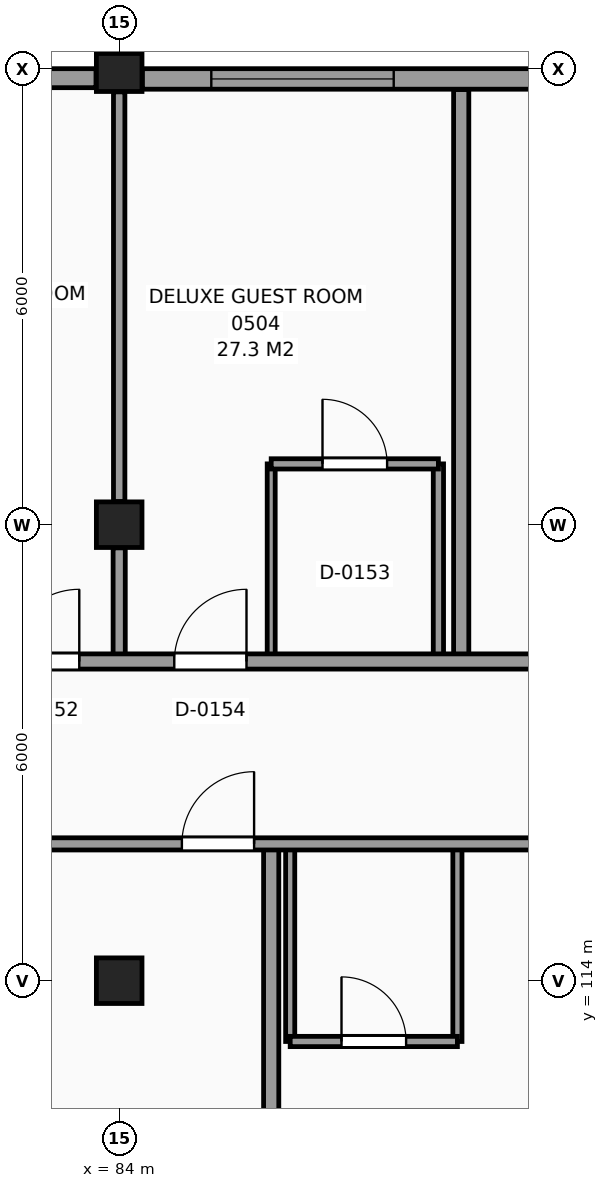
"""IFC4 building model, lengths in metres.
Left out: names, types, materials, properties, quantities, classifications, styles, units other than length and angle.
Written with IfcOpenShell. Run it as: python <this file> out.ifc"""

import sys

from ifc_helpers import new_model, si_unit, direction, frame, frame_2d, origin, origin_2d, place, context, subcontext, project, spatial, rectangle, extrude, element, fill, save


model = new_model("IFC4")
c1 = context("Model", 3, precision=1e-05, world=origin(), true_north=direction((0.0, 1.0)))
c2 = subcontext(c1, "Body", "Model", "MODEL_VIEW")
j1 = project(units=[si_unit("LENGTHUNIT", "METRE"), si_unit("PLANEANGLEUNIT", "RADIAN")], contexts=[c1])
p1 = place(None, origin())
s1 = spatial("IfcSite", under=j1, at=p1, CompositionType="ELEMENT")
p2 = place(p1, origin())
s2 = spatial("IfcBuilding", under=s1, at=p2, CompositionType="ELEMENT")
p3 = place(p2, frame((0.0, 0.0, 24.6)))
s3 = spatial("IfcBuildingStorey", under=s2, at=p3, CompositionType="ELEMENT", Elevation=24.6)
for number, where, z_axis, x_axis in (
    (1, (84.0, 114.0, 0.0), (0.0, 0.0, 1.0), (1.0, 0.0, 0.0)),
    (2, (84.0, 120.0, 0.0), (0.0, 0.0, 1.0), (1.0, 0.0, 0.0)),
    (3, (84.0, 126.0, 0.0), (0.0, 0.0, 1.0), (1.0, 0.0, 0.0)),
):
    element("IfcColumn", number, at=place(p3, frame(where, z_axis=z_axis, x_axis=x_axis)), inside=s3, PredefinedType="COLUMN", context=c2, shape_type="SweptSolid", body=[
        extrude(rectangle(XDim=0.6, YDim=0.6, at=origin_2d()), origin(), (0.0, 0.0, 1.0), 3.6),
    ])
p4 = place(p3, frame((89.72, 125.865, 0.0), z_axis=(0.0, 0.0, 1.0), x_axis=(-1.0, 0.0, 0.0)))
e4 = element("IfcWall", 4, at=p4, inside=s3, PredefinedType="SOLIDWALL", context=c2, shape_type="SweptSolid", body=[
    extrude(rectangle(XDim=5.415, YDim=0.27, at=frame_2d((2.708, 0.0))), origin(), (0.0, 0.0, 1.0), 2.73),
])
p5 = place(p4, frame((2.108, 0.0, 0.8)))
e5 = element("IfcOpeningElement", 5, at=p5, cuts=e4, PredefinedType="OPENING", context=c2, shape_type="SweptSolid", body=[
    extrude(rectangle(XDim=2.4, YDim=1.75, at=frame_2d((1.2, 0.875))), frame((0.0, 0.145, 0.0), z_axis=(0.0, -1.0, 0.0), x_axis=(1.0, 0.0, 0.0)), (0.0, 0.0, 1.0), 0.29),
])
p6 = place(p3, frame((83.695, 125.875, 0.0), z_axis=(0.0, 0.0, 1.0), x_axis=(-1.0, 0.0, 0.0)))
e6 = element("IfcWall", 6, at=p6, inside=s3, PredefinedType="SOLIDWALL", context=c2, shape_type="SweptSolid", body=[
    extrude(rectangle(XDim=5.415, YDim=0.25, at=frame_2d((2.708, 0.0))), origin(), (0.0, 0.0, 1.0), 2.73),
])
p7 = place(p6, frame((0.907, 0.0, 0.8)))
e7 = element("IfcOpeningElement", 7, at=p7, cuts=e6, PredefinedType="OPENING", context=c2, shape_type="SweptSolid", body=[
    extrude(rectangle(XDim=2.4, YDim=1.75, at=frame_2d((1.2, 0.875))), frame((0.0, 0.135, 0.0), z_axis=(0.0, -1.0, 0.0), x_axis=(1.0, 0.0, 0.0)), (0.0, 0.0, 1.0), 0.27),
])
p8 = place(p3, frame((84.0, 118.2, 0.0), z_axis=(0.0, 0.0, 1.0), x_axis=(0.0, 1.0, 0.0)))
e8 = element("IfcWall", 8, at=p8, inside=s3, PredefinedType="PARTITIONING", context=c2, shape_type="SweptSolid", body=[
    extrude(rectangle(XDim=1.495, YDim=0.16, at=frame_2d((0.748, 0.0))), origin(), (0.0, 0.0, 1.0), 2.58),
])
p9 = place(p3, frame((84.0, 120.305, 0.0), z_axis=(0.0, 0.0, 1.0), x_axis=(0.0, 1.0, 0.0)))
e9 = element("IfcWall", 9, at=p9, inside=s3, PredefinedType="PARTITIONING", context=c2, shape_type="SweptSolid", body=[
    extrude(rectangle(XDim=5.39, YDim=0.15, at=frame_2d((2.695, 0.0))), origin(), (0.0, 0.0, 1.0), 2.58),
])
p10 = place(p3, frame((86.0, 108.235, 0.0), z_axis=(0.0, 0.0, 1.0), x_axis=(0.0, 1.0, 0.0)))
e10 = element("IfcWall", 10, at=p10, inside=s3, PredefinedType="PARTITIONING", context=c2, shape_type="SweptSolid", body=[
    extrude(rectangle(XDim=7.565, YDim=0.2, at=frame_2d((3.782, 0.0))), origin(), (0.0, 0.0, 1.0), 3.38),
])
p11 = place(p3, frame((86.0, 118.2, 0.0), z_axis=(0.0, 0.0, 1.0), x_axis=(0.0, 1.0, 0.0)))
e11 = element("IfcWall", 11, at=p11, inside=s3, PredefinedType="PARTITIONING", context=c2, shape_type="SweptSolid", body=[
    extrude(rectangle(XDim=2.6, YDim=0.105, at=frame_2d((1.3, 0.0))), origin(), (0.0, 0.0, 1.0), 3.38),
])
p12 = place(p3, frame((86.25, 113.2, 0.0), z_axis=(0.0, 0.0, 1.0), x_axis=(0.0, 1.0, 0.0)))
e12 = element("IfcWall", 12, at=p12, inside=s3, PredefinedType="PARTITIONING", context=c2, shape_type="SweptSolid", body=[
    extrude(rectangle(XDim=2.6, YDim=0.12, at=frame_2d((1.3, 0.0))), origin(), (0.0, 0.0, 1.0), 3.38),
])
p13 = place(p3, frame((88.2, 118.2, 0.0), z_axis=(0.0, 0.0, 1.0), x_axis=(0.0, 1.0, 0.0)))
e13 = element("IfcWall", 13, at=p13, inside=s3, PredefinedType="PARTITIONING", context=c2, shape_type="SweptSolid", body=[
    extrude(rectangle(XDim=2.6, YDim=0.135, at=frame_2d((1.3, 0.0))), origin(), (0.0, 0.0, 1.0), 3.38),
])
p14 = place(p3, frame((88.45, 113.2, 0.0), z_axis=(0.0, 0.0, 1.0), x_axis=(0.0, 1.0, 0.0)))
e14 = element("IfcWall", 14, at=p14, inside=s3, PredefinedType="PARTITIONING", context=c2, shape_type="SweptSolid", body=[
    extrude(rectangle(XDim=2.6, YDim=0.12, at=frame_2d((1.3, 0.0))), origin(), (0.0, 0.0, 1.0), 3.38),
])
p15 = place(p3, frame((88.5, 118.2, 0.0), z_axis=(0.0, 0.0, 1.0), x_axis=(0.0, 1.0, 0.0)))
e15 = element("IfcWall", 15, at=p15, inside=s3, PredefinedType="PARTITIONING", context=c2, shape_type="SweptSolid", body=[
    extrude(rectangle(XDim=7.525, YDim=0.2, at=frame_2d((3.763, 0.0))), origin(), (0.0, 0.0, 1.0), 3.38),
])
p16 = place(p3, frame((86.25, 113.2, 0.0), z_axis=(0.0, 0.0, 1.0), x_axis=(1.0, 0.0, 0.0)))
e16 = element("IfcWall", 16, at=p16, inside=s3, PredefinedType="PARTITIONING", context=c2, shape_type="SweptSolid", body=[
    extrude(rectangle(XDim=2.2, YDim=0.135, at=frame_2d((1.1, 0.0))), origin(), (0.0, 0.0, 1.0), 3.38),
])
p17 = place(p16, frame((0.675, 0.0, 0.0)))
e17 = element("IfcOpeningElement", 17, at=p17, cuts=e16, PredefinedType="OPENING", context=c2, shape_type="SweptSolid", body=[
    extrude(rectangle(XDim=0.85, YDim=2.1, at=frame_2d((0.425, 1.05))), frame((0.0, 0.078, 0.0), z_axis=(0.0, -1.0, 0.0), x_axis=(1.0, 0.0, 0.0)), (0.0, 0.0, 1.0), 0.155),
])
p18 = place(p3, frame((66.255, 115.8, 0.0), z_axis=(0.0, 0.0, 1.0), x_axis=(1.0, 0.0, 0.0)))
e18 = element("IfcWall", 18, at=p18, inside=s3, PredefinedType="PARTITIONING", context=c2, shape_type="SweptSolid", body=[
    extrude(rectangle(XDim=103.545, YDim=0.16, at=frame_2d((51.772, 0.0))), origin(), (0.0, 0.0, 1.0), 3.38),
])
p19 = place(p18, frame((80.145, 0.0, 0.0)))
e19 = element("IfcOpeningElement", 19, at=p19, cuts=e18, PredefinedType="OPENING", context=c2, shape_type="SweptSolid", body=[
    extrude(rectangle(XDim=1.2, YDim=2.2, at=frame_2d((0.6, 1.1))), frame((0.0, 0.09, 0.0), z_axis=(0.0, -1.0, 0.0), x_axis=(1.0, 0.0, 0.0)), (0.0, 0.0, 1.0), 0.18),
])
p20 = place(p18, frame((50.145, 0.0, 0.0)))
e20 = element("IfcOpeningElement", 20, at=p20, cuts=e18, PredefinedType="OPENING", context=c2, shape_type="SweptSolid", body=[
    extrude(rectangle(XDim=1.2, YDim=2.2, at=frame_2d((0.6, 1.1))), frame((0.0, 0.09, 0.0), z_axis=(0.0, -1.0, 0.0), x_axis=(1.0, 0.0, 0.0)), (0.0, 0.0, 1.0), 0.18),
])
p21 = place(p18, frame((8.995, 0.0, 0.0)))
e21 = element("IfcOpeningElement", 21, at=p21, cuts=e18, PredefinedType="OPENING", context=c2, shape_type="SweptSolid", body=[
    extrude(rectangle(XDim=1.1, YDim=2.15, at=frame_2d((0.55, 1.075))), frame((0.0, 0.09, 0.0), z_axis=(0.0, -1.0, 0.0), x_axis=(1.0, 0.0, 0.0)), (0.0, 0.0, 1.0), 0.18),
])
p22 = place(p18, frame((55.295, 0.0, 0.0)))
e22 = element("IfcOpeningElement", 22, at=p22, cuts=e18, PredefinedType="OPENING", context=c2, shape_type="SweptSolid", body=[
    extrude(rectangle(XDim=1.0, YDim=2.15, at=frame_2d((0.5, 1.075))), frame((0.0, 0.09, 0.0), z_axis=(0.0, -1.0, 0.0), x_axis=(1.0, 0.0, 0.0)), (0.0, 0.0, 1.0), 0.18),
])
p23 = place(p18, frame((62.265, 0.0, 0.0)))
e23 = element("IfcOpeningElement", 23, at=p23, cuts=e18, PredefinedType="OPENING", context=c2, shape_type="SweptSolid", body=[
    extrude(rectangle(XDim=0.96, YDim=2.15, at=frame_2d((0.48, 1.075))), frame((0.0, 0.09, 0.0), z_axis=(0.0, -1.0, 0.0), x_axis=(1.0, 0.0, 0.0)), (0.0, 0.0, 1.0), 0.18),
])
p24 = place(p18, frame((31.945, 0.0, 0.0)))
e24 = element("IfcOpeningElement", 24, at=p24, cuts=e18, PredefinedType="OPENING", context=c2, shape_type="SweptSolid", body=[
    extrude(rectangle(XDim=1.6, YDim=2.25, at=frame_2d((0.8, 1.125))), frame((0.0, 0.09, 0.0), z_axis=(0.0, -1.0, 0.0), x_axis=(1.0, 0.0, 0.0)), (0.0, 0.0, 1.0), 0.18),
])
p25 = place(p18, frame((18.57, 0.0, 0.0)))
e25 = element("IfcOpeningElement", 25, at=p25, cuts=e18, PredefinedType="OPENING", context=c2, shape_type="SweptSolid", body=[
    extrude(rectangle(XDim=0.95, YDim=2.1, at=frame_2d((0.475, 1.05))), frame((0.0, 0.09, 0.0), z_axis=(0.0, -1.0, 0.0), x_axis=(1.0, 0.0, 0.0)), (0.0, 0.0, 1.0), 0.18),
])
p26 = place(p18, frame((24.57, 0.0, 0.0)))
e26 = element("IfcOpeningElement", 26, at=p26, cuts=e18, PredefinedType="OPENING", context=c2, shape_type="SweptSolid", body=[
    extrude(rectangle(XDim=0.95, YDim=2.1, at=frame_2d((0.475, 1.05))), frame((0.0, 0.09, 0.0), z_axis=(0.0, -1.0, 0.0), x_axis=(1.0, 0.0, 0.0)), (0.0, 0.0, 1.0), 0.18),
])
p27 = place(p18, frame((84.47, 0.0, 0.0)))
e27 = element("IfcOpeningElement", 27, at=p27, cuts=e18, PredefinedType="OPENING", context=c2, shape_type="SweptSolid", body=[
    extrude(rectangle(XDim=0.95, YDim=2.1, at=frame_2d((0.475, 1.05))), frame((0.0, 0.09, 0.0), z_axis=(0.0, -1.0, 0.0), x_axis=(1.0, 0.0, 0.0)), (0.0, 0.0, 1.0), 0.18),
])
p28 = place(p3, frame((66.255, 118.2, 0.0), z_axis=(0.0, 0.0, 1.0), x_axis=(1.0, 0.0, 0.0)))
e28 = element("IfcWall", 28, at=p28, inside=s3, PredefinedType="PARTITIONING", context=c2, shape_type="SweptSolid", body=[
    extrude(rectangle(XDim=110.245, YDim=0.2, at=frame_2d((55.123, 0.0))), origin(), (0.0, 0.0, 1.0), 3.38),
])
p29 = place(p28, frame((7.57, 0.0, 0.0)))
e29 = element("IfcOpeningElement", 29, at=p29, cuts=e28, PredefinedType="OPENING", context=c2, shape_type="SweptSolid", body=[
    extrude(rectangle(XDim=0.95, YDim=2.1, at=frame_2d((0.475, 1.05))), frame((0.0, 0.11, 0.0), z_axis=(0.0, -1.0, 0.0), x_axis=(1.0, 0.0, 0.0)), (0.0, 0.0, 1.0), 0.22),
])
p30 = place(p28, frame((12.07, 0.0, 0.0)))
e30 = element("IfcOpeningElement", 30, at=p30, cuts=e28, PredefinedType="OPENING", context=c2, shape_type="SweptSolid", body=[
    extrude(rectangle(XDim=0.95, YDim=2.1, at=frame_2d((0.475, 1.05))), frame((0.0, 0.11, 0.0), z_axis=(0.0, -1.0, 0.0), x_axis=(1.0, 0.0, 0.0)), (0.0, 0.0, 1.0), 0.22),
])
p31 = place(p28, frame((16.27, 0.0, 0.0)))
e31 = element("IfcOpeningElement", 31, at=p31, cuts=e28, PredefinedType="OPENING", context=c2, shape_type="SweptSolid", body=[
    extrude(rectangle(XDim=0.95, YDim=2.1, at=frame_2d((0.475, 1.05))), frame((0.0, 0.11, 0.0), z_axis=(0.0, -1.0, 0.0), x_axis=(1.0, 0.0, 0.0)), (0.0, 0.0, 1.0), 0.22),
])
p32 = place(p28, frame((18.47, 0.0, 0.0)))
e32 = element("IfcOpeningElement", 32, at=p32, cuts=e28, PredefinedType="OPENING", context=c2, shape_type="SweptSolid", body=[
    extrude(rectangle(XDim=0.95, YDim=2.1, at=frame_2d((0.475, 1.05))), frame((0.0, 0.11, 0.0), z_axis=(0.0, -1.0, 0.0), x_axis=(1.0, 0.0, 0.0)), (0.0, 0.0, 1.0), 0.22),
])
p33 = place(p28, frame((32.32, 0.0, 0.0)))
e33 = element("IfcOpeningElement", 33, at=p33, cuts=e28, PredefinedType="OPENING", context=c2, shape_type="SweptSolid", body=[
    extrude(rectangle(XDim=0.95, YDim=2.1, at=frame_2d((0.475, 1.05))), frame((0.0, 0.11, 0.0), z_axis=(0.0, -1.0, 0.0), x_axis=(1.0, 0.0, 0.0)), (0.0, 0.0, 1.0), 0.22),
])
p34 = place(p28, frame((36.47, 0.0, 0.0)))
e34 = element("IfcOpeningElement", 34, at=p34, cuts=e28, PredefinedType="OPENING", context=c2, shape_type="SweptSolid", body=[
    extrude(rectangle(XDim=0.95, YDim=2.1, at=frame_2d((0.475, 1.05))), frame((0.0, 0.11, 0.0), z_axis=(0.0, -1.0, 0.0), x_axis=(1.0, 0.0, 0.0)), (0.0, 0.0, 1.0), 0.22),
])
p35 = place(p28, frame((46.27, 0.0, 0.0)))
e35 = element("IfcOpeningElement", 35, at=p35, cuts=e28, PredefinedType="OPENING", context=c2, shape_type="SweptSolid", body=[
    extrude(rectangle(XDim=0.95, YDim=2.1, at=frame_2d((0.475, 1.05))), frame((0.0, 0.11, 0.0), z_axis=(0.0, -1.0, 0.0), x_axis=(1.0, 0.0, 0.0)), (0.0, 0.0, 1.0), 0.22),
])
p36 = place(p28, frame((48.47, 0.0, 0.0)))
e36 = element("IfcOpeningElement", 36, at=p36, cuts=e28, PredefinedType="OPENING", context=c2, shape_type="SweptSolid", body=[
    extrude(rectangle(XDim=0.95, YDim=2.1, at=frame_2d((0.475, 1.05))), frame((0.0, 0.11, 0.0), z_axis=(0.0, -1.0, 0.0), x_axis=(1.0, 0.0, 0.0)), (0.0, 0.0, 1.0), 0.22),
])
p37 = place(p28, frame((52.87, 0.0, 0.0)))
e37 = element("IfcOpeningElement", 37, at=p37, cuts=e28, PredefinedType="OPENING", context=c2, shape_type="SweptSolid", body=[
    extrude(rectangle(XDim=0.95, YDim=2.1, at=frame_2d((0.475, 1.05))), frame((0.0, 0.11, 0.0), z_axis=(0.0, -1.0, 0.0), x_axis=(1.0, 0.0, 0.0)), (0.0, 0.0, 1.0), 0.22),
])
p38 = place(p28, frame((60.07, 0.0, 0.0)))
e38 = element("IfcOpeningElement", 38, at=p38, cuts=e28, PredefinedType="OPENING", context=c2, shape_type="SweptSolid", body=[
    extrude(rectangle(XDim=0.95, YDim=2.1, at=frame_2d((0.475, 1.05))), frame((0.0, 0.11, 0.0), z_axis=(0.0, -1.0, 0.0), x_axis=(1.0, 0.0, 0.0)), (0.0, 0.0, 1.0), 0.22),
])
p39 = place(p28, frame((68.32, 0.0, 0.0)))
e39 = element("IfcOpeningElement", 39, at=p39, cuts=e28, PredefinedType="OPENING", context=c2, shape_type="SweptSolid", body=[
    extrude(rectangle(XDim=0.95, YDim=2.1, at=frame_2d((0.475, 1.05))), frame((0.0, 0.11, 0.0), z_axis=(0.0, -1.0, 0.0), x_axis=(1.0, 0.0, 0.0)), (0.0, 0.0, 1.0), 0.22),
])
p40 = place(p28, frame((80.32, 0.0, 0.0)))
e40 = element("IfcOpeningElement", 40, at=p40, cuts=e28, PredefinedType="OPENING", context=c2, shape_type="SweptSolid", body=[
    extrude(rectangle(XDim=0.95, YDim=2.1, at=frame_2d((0.475, 1.05))), frame((0.0, 0.11, 0.0), z_axis=(0.0, -1.0, 0.0), x_axis=(1.0, 0.0, 0.0)), (0.0, 0.0, 1.0), 0.22),
])
p41 = place(p28, frame((82.87, 0.0, 0.0)))
e41 = element("IfcOpeningElement", 41, at=p41, cuts=e28, PredefinedType="OPENING", context=c2, shape_type="SweptSolid", body=[
    extrude(rectangle(XDim=0.95, YDim=2.1, at=frame_2d((0.475, 1.05))), frame((0.0, 0.11, 0.0), z_axis=(0.0, -1.0, 0.0), x_axis=(1.0, 0.0, 0.0)), (0.0, 0.0, 1.0), 0.22),
])
p42 = place(p28, frame((90.07, 0.0, 0.0)))
e42 = element("IfcOpeningElement", 42, at=p42, cuts=e28, PredefinedType="OPENING", context=c2, shape_type="SweptSolid", body=[
    extrude(rectangle(XDim=0.95, YDim=2.1, at=frame_2d((0.475, 1.05))), frame((0.0, 0.11, 0.0), z_axis=(0.0, -1.0, 0.0), x_axis=(1.0, 0.0, 0.0)), (0.0, 0.0, 1.0), 0.22),
])
p43 = place(p28, frame((94.27, 0.0, 0.0)))
e43 = element("IfcOpeningElement", 43, at=p43, cuts=e28, PredefinedType="OPENING", context=c2, shape_type="SweptSolid", body=[
    extrude(rectangle(XDim=0.95, YDim=2.1, at=frame_2d((0.475, 1.05))), frame((0.0, 0.11, 0.0), z_axis=(0.0, -1.0, 0.0), x_axis=(1.0, 0.0, 0.0)), (0.0, 0.0, 1.0), 0.22),
])
p44 = place(p28, frame((103.57, 0.0, 0.0)))
e44 = element("IfcOpeningElement", 44, at=p44, cuts=e28, PredefinedType="OPENING", context=c2, shape_type="SweptSolid", body=[
    extrude(rectangle(XDim=0.95, YDim=2.1, at=frame_2d((0.475, 1.05))), frame((0.0, 0.11, 0.0), z_axis=(0.0, -1.0, 0.0), x_axis=(1.0, 0.0, 0.0)), (0.0, 0.0, 1.0), 0.22),
])
p45 = place(p28, frame((104.97, 0.0, 0.0)))
e45 = element("IfcOpeningElement", 45, at=p45, cuts=e28, PredefinedType="OPENING", context=c2, shape_type="SweptSolid", body=[
    extrude(rectangle(XDim=0.95, YDim=2.1, at=frame_2d((0.475, 1.05))), frame((0.0, 0.11, 0.0), z_axis=(0.0, -1.0, 0.0), x_axis=(1.0, 0.0, 0.0)), (0.0, 0.0, 1.0), 0.22),
])
p46 = place(p3, frame((86.0, 120.8, 0.0), z_axis=(0.0, 0.0, 1.0), x_axis=(1.0, 0.0, 0.0)))
e46 = element("IfcWall", 46, at=p46, inside=s3, PredefinedType="PARTITIONING", context=c2, shape_type="SweptSolid", body=[
    extrude(rectangle(XDim=2.2, YDim=0.135, at=frame_2d((1.1, 0.0))), origin(), (0.0, 0.0, 1.0), 3.38),
])
p47 = place(p46, frame((0.675, 0.0, 0.0)))
e47 = element("IfcOpeningElement", 47, at=p47, cuts=e46, PredefinedType="OPENING", context=c2, shape_type="SweptSolid", body=[
    extrude(rectangle(XDim=0.85, YDim=2.1, at=frame_2d((0.425, 1.05))), frame((0.0, 0.078, 0.0), z_axis=(0.0, -1.0, 0.0), x_axis=(1.0, 0.0, 0.0)), (0.0, 0.0, 1.0), 0.155),
])
p48 = place(p5, origin())
e48 = element("IfcWindow", 48, at=p48, inside=s3, PartitioningType="SINGLE_PANEL", PredefinedType="WINDOW", context=c2, shape_type="SweptSolid", body=[
    extrude(rectangle(XDim=2.4, YDim=1.75, at=frame_2d((1.2, 0.875))), frame((0.0, 0.03, 0.0), z_axis=(0.0, -1.0, 0.0), x_axis=(1.0, 0.0, 0.0)), (0.0, 0.0, 1.0), 0.06),
])
fill(e5, e48)
p49 = place(p31, origin())
e49 = element("IfcDoor", 49, at=p49, inside=s3, OperationType="SINGLE_SWING_RIGHT", PredefinedType="DOOR", context=c2, shape_type="SweptSolid", body=[
    extrude(rectangle(XDim=0.95, YDim=2.1, at=frame_2d((0.475, 1.05))), frame((0.0, 0.025, 0.0), z_axis=(0.0, -1.0, 0.0), x_axis=(1.0, 0.0, 0.0)), (0.0, 0.0, 1.0), 0.05),
])
fill(e31, e49)
p50 = place(p47, origin())
e50 = element("IfcDoor", 50, at=p50, inside=s3, OperationType="SINGLE_SWING_LEFT", PredefinedType="DOOR", context=c2, shape_type="SweptSolid", body=[
    extrude(rectangle(XDim=0.85, YDim=2.1, at=frame_2d((0.425, 1.05))), frame((0.0, 0.025, 0.0), z_axis=(0.0, -1.0, 0.0), x_axis=(1.0, 0.0, 0.0)), (0.0, 0.0, 1.0), 0.05),
])
fill(e47, e50)
p51 = place(p32, origin())
e51 = element("IfcDoor", 51, at=p51, inside=s3, OperationType="SINGLE_SWING_RIGHT", PredefinedType="DOOR", context=c2, shape_type="SweptSolid", body=[
    extrude(rectangle(XDim=0.95, YDim=2.1, at=frame_2d((0.475, 1.05))), frame((0.0, 0.025, 0.0), z_axis=(0.0, -1.0, 0.0), x_axis=(1.0, 0.0, 0.0)), (0.0, 0.0, 1.0), 0.05),
])
fill(e32, e51)
p52 = place(p25, origin())
e52 = element("IfcDoor", 52, at=p52, inside=s3, OperationType="SINGLE_SWING_RIGHT", PredefinedType="DOOR", context=c2, shape_type="SweptSolid", body=[
    extrude(rectangle(XDim=0.95, YDim=2.1, at=frame_2d((0.475, 1.05))), frame((0.0, 0.025, 0.0), z_axis=(0.0, -1.0, 0.0), x_axis=(1.0, 0.0, 0.0)), (0.0, 0.0, 1.0), 0.05),
])
fill(e25, e52)
p53 = place(p17, origin())
e53 = element("IfcDoor", 53, at=p53, inside=s3, OperationType="SINGLE_SWING_LEFT", PredefinedType="DOOR", context=c2, shape_type="SweptSolid", body=[
    extrude(rectangle(XDim=0.85, YDim=2.1, at=frame_2d((0.425, 1.05))), frame((0.0, 0.025, 0.0), z_axis=(0.0, -1.0, 0.0), x_axis=(1.0, 0.0, 0.0)), (0.0, 0.0, 1.0), 0.05),
])
fill(e17, e53)
save(model, sys.argv[1])
